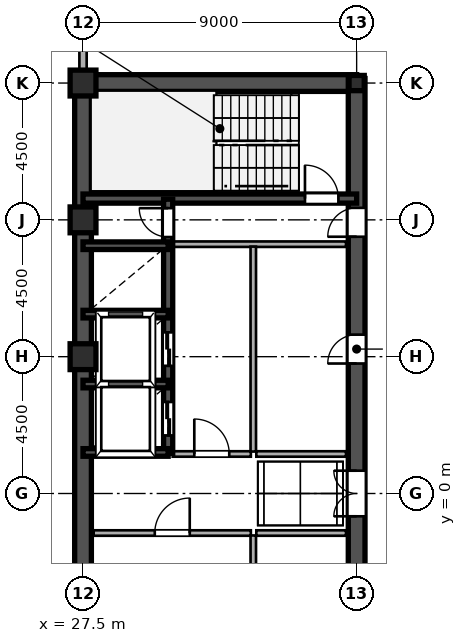
"""IFC4 building model, lengths in metres.
Left out: names, types, materials, properties, quantities, classifications, styles, units other than length and angle.
Written with IfcOpenShell. Run it as: python <this file> out.ifc"""

import sys

from ifc_helpers import new_model, si_unit, direction, frame, frame_2d, origin, origin_2d, place, context, subcontext, project, spatial, rectangle, hollow_rectangle, i_section, extrude, source, transform, mapped, element, fill, save


model = new_model("IFC4")
c1 = context("Model", 3, precision=1e-05, world=origin(), true_north=direction((0.0, 1.0)))
c2 = subcontext(c1, "Body", "Model", "MODEL_VIEW")
j1 = project(units=[si_unit("LENGTHUNIT", "METRE"), si_unit("PLANEANGLEUNIT", "RADIAN")], contexts=[c1])
p1 = place(None, origin())
s1 = spatial("IfcSite", under=j1, at=p1, CompositionType="ELEMENT")
p2 = place(p1, origin())
s2 = spatial("IfcBuilding", under=s1, at=p2, CompositionType="ELEMENT")
p3 = place(p2, frame((0.0, 0.0, 203.1)))
s3 = spatial("IfcBuildingStorey", under=s2, at=p3, CompositionType="ELEMENT", Elevation=203.1)
m1 = source(origin(), c2, "Body", "SweptSolid", [
    extrude(hollow_rectangle(XDim=0.85, YDim=0.85, WallThickness=0.036, at=origin_2d()), origin(), (0.0, 0.0, 1.0), 3.6),
])
for number, where, z_axis, x_axis in (
    (1, (27.5, 4.5, 0.0), (0.0, 0.0, 1.0), (1.0, 0.0, 0.0)),
    (2, (27.5, 9.0, 0.0), (0.0, 0.0, 1.0), (1.0, 0.0, 0.0)),
    (3, (27.5, 13.5, 0.0), (0.0, 0.0, 1.0), (1.0, 0.0, 0.0)),
):
    element("IfcColumn", number, at=place(p3, frame(where, z_axis=z_axis, x_axis=x_axis)), inside=s3, PredefinedType="COLUMN", context=c2, shape_type="MappedRepresentation", body=[
        mapped(m1, transform((0.0, 0.0, 0.0), scale=1.0)),
    ])
m2 = source(origin(), c2, "Body", "SweptSolid", [
    extrude(i_section(OverallWidth=0.5, OverallDepth=0.5, WebThickness=0.02, FlangeThickness=0.032, at=origin_2d()), origin(), (0.0, 0.0, 1.0), 3.6),
])
p4 = place(p3, frame((36.5, 13.5, 0.0), z_axis=(0.0, 0.0, 1.0), x_axis=(1.0, 0.0, 0.0)))
e4 = element("IfcColumn", 4, at=p4, inside=s3, PredefinedType="COLUMN", context=c2, shape_type="MappedRepresentation", body=[
    mapped(m2, transform((0.0, 0.0, 0.0), scale=1.0)),
])
p5 = place(p3, frame((27.5, 13.78, 0.0), z_axis=(0.0, 0.0, 1.0), x_axis=(0.0, 1.0, 0.0)))
e5 = element("IfcWall", 5, at=p5, inside=s3, PredefinedType="SOLIDWALL", context=c2, shape_type="SweptSolid", body=[
    extrude(rectangle(XDim=0.6, YDim=0.24, at=frame_2d((0.3, 0.0))), origin(), (0.0, 0.0, 1.0), 2.88),
])
p6 = place(p3, frame((27.5, 14.38, 0.0), z_axis=(0.0, 0.0, 1.0), x_axis=(0.0, 1.0, 0.0)))
e6 = element("IfcWall", 6, at=p6, inside=s3, PredefinedType="SOLIDWALL", context=c2, shape_type="SweptSolid", body=[
    extrude(rectangle(XDim=1.6, YDim=0.24, at=frame_2d((0.8, 0.0))), origin(), (0.0, 0.0, 1.0), 3.38),
])
for number, where, z_axis, x_axis in (
    (7, (27.5, -13.5, 0.0), (0.0, 0.0, 1.0), (0.0, 1.0, 0.0)),
    (8, (27.5, 1.3, 0.0), (0.0, 0.0, 1.0), (0.0, 1.0, 0.0)),
):
    element("IfcWall", number, at=place(p3, frame(where, z_axis=z_axis, x_axis=x_axis)), inside=s3, PredefinedType="SHEAR", context=c2, shape_type="SweptSolid", body=[
        extrude(rectangle(XDim=12.2, YDim=0.55, at=frame_2d((6.1, 0.0))), origin(), (0.0, 0.0, 1.0), 3.38),
    ])
p7 = place(p3, frame((27.5, -1.3, 0.0), z_axis=(0.0, 0.0, 1.0), x_axis=(0.0, 1.0, 0.0)))
e9 = element("IfcWall", 9, at=p7, inside=s3, PredefinedType="SHEAR", context=c2, shape_type="SweptSolid", body=[
    extrude(rectangle(XDim=2.6, YDim=0.55, at=frame_2d((1.3, 0.0))), origin(), (0.0, 0.0, 1.0), 3.38),
])
p8 = place(p3, frame((27.5, 13.5, 0.0), z_axis=(0.0, 0.0, 1.0), x_axis=(1.0, 0.0, 0.0)))
e10 = element("IfcWall", 10, at=p8, inside=s3, PredefinedType="SHEAR", context=c2, shape_type="SweptSolid", body=[
    extrude(rectangle(XDim=9.0, YDim=0.55, at=frame_2d((4.5, 0.0))), origin(), (0.0, 0.0, 1.0), 3.38),
])
p9 = place(p3, frame((36.5, -1.3, 0.0), z_axis=(0.0, 0.0, 1.0), x_axis=(0.0, 1.0, 0.0)))
e11 = element("IfcWall", 11, at=p9, inside=s3, PredefinedType="SHEAR", context=c2, shape_type="SweptSolid", body=[
    extrude(rectangle(XDim=2.6, YDim=0.55, at=frame_2d((1.3, 0.0))), origin(), (0.0, 0.0, 1.0), 3.38),
])
p10 = place(p9, frame((0.55, 0.0, 0.0)))
e12 = element("IfcOpeningElement", 12, at=p10, cuts=e11, PredefinedType="OPENING", context=c2, shape_type="SweptSolid", body=[
    extrude(rectangle(XDim=1.5, YDim=2.3, at=frame_2d((0.75, 1.15))), frame((0.0, 0.285, 0.0), z_axis=(0.0, -1.0, 0.0), x_axis=(1.0, 0.0, 0.0)), (0.0, 0.0, 1.0), 0.57),
])
p11 = place(p3, frame((36.5, 8.2, 0.0), z_axis=(0.0, 0.0, 1.0), x_axis=(0.0, 1.0, 0.0)))
e13 = element("IfcWall", 13, at=p11, inside=s3, PredefinedType="SHEAR", context=c2, shape_type="SweptSolid", body=[
    extrude(rectangle(XDim=5.45, YDim=0.55, at=frame_2d((2.725, 0.0))), origin(), (0.0, 0.0, 1.0), 3.38),
])
p12 = place(p11, frame((0.245, 0.0, 0.0)))
e14 = element("IfcOpeningElement", 14, at=p12, cuts=e13, PredefinedType="OPENING", context=c2, shape_type="SweptSolid", body=[
    extrude(rectangle(XDim=0.95, YDim=2.15, at=frame_2d((0.475, 1.075))), frame((0.0, 0.285, 0.0), z_axis=(0.0, -1.0, 0.0), x_axis=(1.0, 0.0, 0.0)), (0.0, 0.0, 1.0), 0.57),
])
p13 = place(p3, frame((36.5, -6.5, 0.0), z_axis=(0.0, 0.0, 1.0), x_axis=(0.0, 1.0, 0.0)))
e15 = element("IfcWall", 15, at=p13, inside=s3, PredefinedType="SHEAR", context=c2, shape_type="SweptSolid", body=[
    extrude(rectangle(XDim=5.2, YDim=0.55, at=frame_2d((2.6, 0.0))), origin(), (0.0, 0.0, 1.0), 3.38),
])
p14 = place(p13, frame((2.125, 0.0, 0.0)))
e16 = element("IfcOpeningElement", 16, at=p14, cuts=e15, PredefinedType="OPENING", context=c2, shape_type="SweptSolid", body=[
    extrude(rectangle(XDim=0.95, YDim=2.15, at=frame_2d((0.475, 1.075))), frame((0.0, 0.285, 0.0), z_axis=(0.0, -1.0, 0.0), x_axis=(1.0, 0.0, 0.0)), (0.0, 0.0, 1.0), 0.57),
])
p15 = place(p3, frame((36.5, 1.3, 0.0), z_axis=(0.0, 0.0, 1.0), x_axis=(0.0, 1.0, 0.0)))
e17 = element("IfcWall", 17, at=p15, inside=s3, PredefinedType="SHEAR", context=c2, shape_type="SweptSolid", body=[
    extrude(rectangle(XDim=6.9, YDim=0.55, at=frame_2d((3.45, 0.0))), origin(), (0.0, 0.0, 1.0), 3.38),
])
p16 = place(p15, frame((2.975, 0.0, 0.0)))
e18 = element("IfcOpeningElement", 18, at=p16, cuts=e17, PredefinedType="OPENING", context=c2, shape_type="SweptSolid", body=[
    extrude(rectangle(XDim=0.95, YDim=2.15, at=frame_2d((0.475, 1.075))), frame((0.0, 0.285, 0.0), z_axis=(0.0, -1.0, 0.0), x_axis=(1.0, 0.0, 0.0)), (0.0, 0.0, 1.0), 0.57),
])
p17 = place(p3, frame((27.5, 9.7, 0.0), z_axis=(0.0, 0.0, 1.0), x_axis=(1.0, 0.0, 0.0)))
e19 = element("IfcWall", 19, at=p17, inside=s3, PredefinedType="SHEAR", context=c2, shape_type="SweptSolid", body=[
    extrude(rectangle(XDim=9.0, YDim=0.3, at=frame_2d((4.5, 0.0))), origin(), (0.0, 0.0, 1.0), 3.38),
])
p18 = place(p17, frame((7.3, 0.0, 0.0)))
e20 = element("IfcOpeningElement", 20, at=p18, cuts=e19, PredefinedType="OPENING", context=c2, shape_type="SweptSolid", body=[
    extrude(rectangle(XDim=1.1, YDim=2.2, at=frame_2d((0.55, 1.1))), frame((0.0, 0.16, 0.0), z_axis=(0.0, -1.0, 0.0), x_axis=(1.0, 0.0, 0.0)), (0.0, 0.0, 1.0), 0.32),
])
for number, where, z_axis, x_axis in (
    (21, (27.5, 1.35, 0.0), (0.0, 0.0, 1.0), (1.0, 0.0, 0.0)),
    (22, (27.5, 3.6, 0.0), (0.0, 0.0, 1.0), (1.0, 0.0, 0.0)),
    (23, (27.5, 5.9, 0.0), (0.0, 0.0, 1.0), (1.0, 0.0, 0.0)),
    (24, (27.5, 8.15, 0.0), (0.0, 0.0, 1.0), (1.0, 0.0, 0.0)),
):
    element("IfcWall", number, at=place(p3, frame(where, z_axis=z_axis, x_axis=x_axis)), inside=s3, PredefinedType="SHEAR", context=c2, shape_type="SweptSolid", body=[
        extrude(rectangle(XDim=2.8, YDim=0.25, at=frame_2d((1.4, 0.0))), origin(), (0.0, 0.0, 1.0), 3.38),
    ])
p19 = place(p3, frame((30.3, 1.32, 0.0), z_axis=(0.0, 0.0, 1.0), x_axis=(0.0, 1.0, 0.0)))
e25 = element("IfcWall", 25, at=p19, inside=s3, PredefinedType="SHEAR", context=c2, shape_type="SweptSolid", body=[
    extrude(rectangle(XDim=2.28, YDim=0.3, at=frame_2d((1.14, 0.0))), origin(), (0.0, 0.0, 1.0), 3.38),
])
p20 = place(p19, frame((0.59, 0.0, 0.0)))
e26 = element("IfcOpeningElement", 26, at=p20, cuts=e25, PredefinedType="OPENING", context=c2, shape_type="SweptSolid", body=[
    extrude(rectangle(XDim=1.1, YDim=2.2, at=frame_2d((0.55, 1.1))), frame((0.0, 0.16, 0.0), z_axis=(0.0, -1.0, 0.0), x_axis=(1.0, 0.0, 0.0)), (0.0, 0.0, 1.0), 0.32),
])
p21 = place(p3, frame((30.3, 3.6, 0.0), z_axis=(0.0, 0.0, 1.0), x_axis=(0.0, 1.0, 0.0)))
e27 = element("IfcWall", 27, at=p21, inside=s3, PredefinedType="SHEAR", context=c2, shape_type="SweptSolid", body=[
    extrude(rectangle(XDim=2.3, YDim=0.3, at=frame_2d((1.15, 0.0))), origin(), (0.0, 0.0, 1.0), 3.38),
])
p22 = place(p21, frame((0.6, 0.0, 0.0)))
e28 = element("IfcOpeningElement", 28, at=p22, cuts=e27, PredefinedType="OPENING", context=c2, shape_type="SweptSolid", body=[
    extrude(rectangle(XDim=1.1, YDim=2.2, at=frame_2d((0.55, 1.1))), frame((0.0, 0.16, 0.0), z_axis=(0.0, -1.0, 0.0), x_axis=(1.0, 0.0, 0.0)), (0.0, 0.0, 1.0), 0.32),
])
p23 = place(p3, frame((30.3, 5.9, 0.0), z_axis=(0.0, 0.0, 1.0), x_axis=(0.0, 1.0, 0.0)))
e29 = element("IfcWall", 29, at=p23, inside=s3, PredefinedType="SHEAR", context=c2, shape_type="SweptSolid", body=[
    extrude(rectangle(XDim=2.25, YDim=0.3, at=frame_2d((1.125, 0.0))), origin(), (0.0, 0.0, 1.0), 3.38),
])
p24 = place(p3, frame((30.3, 8.15, 0.0), z_axis=(0.0, 0.0, 1.0), x_axis=(0.0, 1.0, 0.0)))
e30 = element("IfcWall", 30, at=p24, inside=s3, PredefinedType="SHEAR", context=c2, shape_type="SweptSolid", body=[
    extrude(rectangle(XDim=1.53, YDim=0.3, at=frame_2d((0.765, 0.0))), origin(), (0.0, 0.0, 1.0), 3.38),
])
p25 = place(p24, frame((0.285, 0.0, 0.0)))
e31 = element("IfcOpeningElement", 31, at=p25, cuts=e30, PredefinedType="OPENING", context=c2, shape_type="SweptSolid", body=[
    extrude(rectangle(XDim=0.95, YDim=2.15, at=frame_2d((0.475, 1.075))), frame((0.0, 0.16, 0.0), z_axis=(0.0, -1.0, 0.0), x_axis=(1.0, 0.0, 0.0)), (0.0, 0.0, 1.0), 0.32),
])
p26 = place(p3, frame((30.45, 8.2, 0.0), z_axis=(0.0, 0.0, 1.0), x_axis=(1.0, 0.0, 0.0)))
e32 = element("IfcWall", 32, at=p26, inside=s3, PredefinedType="PARTITIONING", context=c2, shape_type="SweptSolid", body=[
    extrude(rectangle(XDim=5.7, YDim=0.18, at=frame_2d((2.85, 0.0))), origin(), (0.0, 0.0, 1.0), 3.38),
])
p27 = place(p3, frame((33.1, -6.42, 0.0), z_axis=(0.0, 0.0, 1.0), x_axis=(0.0, 1.0, 0.0)))
e33 = element("IfcWall", 33, at=p27, inside=s3, PredefinedType="PARTITIONING", context=c2, shape_type="SweptSolid", body=[
    extrude(rectangle(XDim=5.04, YDim=0.18, at=frame_2d((2.52, 0.0))), origin(), (0.0, 0.0, 1.0), 3.38),
])
p28 = place(p3, frame((33.1, 1.38, 0.0), z_axis=(0.0, 0.0, 1.0), x_axis=(0.0, 1.0, 0.0)))
e34 = element("IfcWall", 34, at=p28, inside=s3, PredefinedType="PARTITIONING", context=c2, shape_type="SweptSolid", body=[
    extrude(rectangle(XDim=6.74, YDim=0.18, at=frame_2d((3.37, 0.0))), origin(), (0.0, 0.0, 1.0), 3.38),
])
p29 = place(p3, frame((27.85, -1.3, 0.0), z_axis=(0.0, 0.0, 1.0), x_axis=(1.0, 0.0, 0.0)))
e35 = element("IfcWall", 35, at=p29, inside=s3, PredefinedType="PARTITIONING", context=c2, shape_type="SweptSolid", body=[
    extrude(rectangle(XDim=5.17, YDim=0.18, at=frame_2d((2.585, 0.0))), origin(), (0.0, 0.0, 1.0), 3.38),
])
p30 = place(p29, frame((2.01, 0.0, 0.0)))
e36 = element("IfcOpeningElement", 36, at=p30, cuts=e35, PredefinedType="OPENING", context=c2, shape_type="SweptSolid", body=[
    extrude(rectangle(XDim=1.15, YDim=2.2, at=frame_2d((0.575, 1.1))), frame((0.0, 0.1, 0.0), z_axis=(0.0, -1.0, 0.0), x_axis=(1.0, 0.0, 0.0)), (0.0, 0.0, 1.0), 0.2),
])
p31 = place(p3, frame((30.45, 1.3, 0.0), z_axis=(0.0, 0.0, 1.0), x_axis=(1.0, 0.0, 0.0)))
e37 = element("IfcWall", 37, at=p31, inside=s3, PredefinedType="PARTITIONING", context=c2, shape_type="SweptSolid", body=[
    extrude(rectangle(XDim=2.57, YDim=0.18, at=frame_2d((1.285, 0.0))), origin(), (0.0, 0.0, 1.0), 3.38),
])
p32 = place(p31, frame((0.71, 0.0, 0.0)))
e38 = element("IfcOpeningElement", 38, at=p32, cuts=e37, PredefinedType="OPENING", context=c2, shape_type="SweptSolid", body=[
    extrude(rectangle(XDim=1.15, YDim=2.2, at=frame_2d((0.575, 1.1))), frame((0.0, 0.1, 0.0), z_axis=(0.0, -1.0, 0.0), x_axis=(1.0, 0.0, 0.0)), (0.0, 0.0, 1.0), 0.2),
])
for number, where, z_axis, x_axis in (
    (39, (33.2, -1.3, 0.0), (0.0, 0.0, 1.0), (1.0, 0.0, 0.0)),
    (40, (33.2, 1.3, 0.0), (0.0, 0.0, 1.0), (1.0, 0.0, 0.0)),
):
    element("IfcWall", number, at=place(p3, frame(where, z_axis=z_axis, x_axis=x_axis)), inside=s3, PredefinedType="PARTITIONING", context=c2, shape_type="SweptSolid", body=[
        extrude(rectangle(XDim=2.95, YDim=0.18, at=frame_2d((1.475, 0.0))), origin(), (0.0, 0.0, 1.0), 3.38),
    ])
m3 = source(origin(), c2, "Body", "SweptSolid", [
    extrude(rectangle(XDim=1.5, YDim=2.3, at=frame_2d((0.75, 1.15))), frame((0.0, 0.025, 0.0), z_axis=(0.0, -1.0, 0.0), x_axis=(1.0, 0.0, 0.0)), (0.0, 0.0, 1.0), 0.05),
])
p33 = place(p10, origin())
e41 = element("IfcDoor", 41, at=p33, inside=s3, OperationType="DOUBLE_SWING_LEFT", PredefinedType="DOOR", context=c2, shape_type="MappedRepresentation", body=[
    mapped(m3, transform((0.0, 0.0, 0.0), scale=1.0)),
])
fill(e12, e41)
m4 = source(origin(), c2, "Body", "SweptSolid", [
    extrude(rectangle(XDim=0.95, YDim=2.15, at=frame_2d((0.475, 1.075))), frame((0.0, 0.025, 0.0), z_axis=(0.0, -1.0, 0.0), x_axis=(1.0, 0.0, 0.0)), (0.0, 0.0, 1.0), 0.05),
])
p34 = place(p12, origin())
e42 = element("IfcDoor", 42, at=p34, inside=s3, OperationType="SINGLE_SWING_LEFT", PredefinedType="DOOR", context=c2, shape_type="MappedRepresentation", body=[
    mapped(m4, transform((0.0, 0.0, 0.0), scale=1.0)),
])
fill(e14, e42)
p35 = place(p16, origin())
e43 = element("IfcDoor", 43, at=p35, inside=s3, OperationType="SINGLE_SWING_LEFT", PredefinedType="DOOR", context=c2, shape_type="MappedRepresentation", body=[
    mapped(m4, transform((0.0, 0.0, 0.0), scale=1.0)),
])
fill(e18, e43)
m5 = source(origin(), c2, "Body", "SweptSolid", [
    extrude(rectangle(XDim=1.1, YDim=2.2, at=frame_2d((0.55, 1.1))), frame((0.0, 0.025, 0.0), z_axis=(0.0, -1.0, 0.0), x_axis=(1.0, 0.0, 0.0)), (0.0, 0.0, 1.0), 0.05),
])
p36 = place(p18, origin())
e44 = element("IfcDoor", 44, at=p36, inside=s3, OperationType="SINGLE_SWING_LEFT", PredefinedType="DOOR", context=c2, shape_type="MappedRepresentation", body=[
    mapped(m5, transform((0.0, 0.0, 0.0), scale=1.0)),
])
fill(e20, e44)
m6 = source(origin(), c2, "Body", "SweptSolid", [
    extrude(rectangle(XDim=1.1, YDim=2.2, at=frame_2d((0.55, 1.1))), frame((0.0, 0.025, 0.0), z_axis=(0.0, -1.0, 0.0), x_axis=(1.0, 0.0, 0.0)), (0.0, 0.0, 1.0), 0.05),
])
p37 = place(p20, origin())
e45 = element("IfcDoor", 45, at=p37, inside=s3, OperationType="DOUBLE_DOOR_SLIDING", PredefinedType="DOOR", context=c2, shape_type="MappedRepresentation", body=[
    mapped(m6, transform((0.0, 0.0, 0.0), scale=1.0)),
])
fill(e26, e45)
p38 = place(p22, origin())
e46 = element("IfcDoor", 46, at=p38, inside=s3, OperationType="DOUBLE_DOOR_SLIDING", PredefinedType="DOOR", context=c2, shape_type="MappedRepresentation", body=[
    mapped(m6, transform((0.0, 0.0, 0.0), scale=1.0)),
])
fill(e28, e46)
p39 = place(p25, origin())
e47 = element("IfcDoor", 47, at=p39, inside=s3, OperationType="SINGLE_SWING_RIGHT", PredefinedType="DOOR", context=c2, shape_type="MappedRepresentation", body=[
    mapped(m4, transform((0.0, 0.0, 0.0), scale=1.0)),
])
fill(e31, e47)
m7 = source(origin(), c2, "Body", "SweptSolid", [
    extrude(rectangle(XDim=1.15, YDim=2.2, at=frame_2d((0.575, 1.1))), frame((0.0, 0.025, 0.0), z_axis=(0.0, -1.0, 0.0), x_axis=(1.0, 0.0, 0.0)), (0.0, 0.0, 1.0), 0.05),
])
p40 = place(p30, origin())
e48 = element("IfcDoor", 48, at=p40, inside=s3, OperationType="SINGLE_SWING_RIGHT", PredefinedType="DOOR", context=c2, shape_type="MappedRepresentation", body=[
    mapped(m7, transform((0.0, 0.0, 0.0), scale=1.0)),
])
fill(e36, e48)
p41 = place(p32, origin())
e49 = element("IfcDoor", 49, at=p41, inside=s3, OperationType="SINGLE_SWING_LEFT", PredefinedType="DOOR", context=c2, shape_type="MappedRepresentation", body=[
    mapped(m7, transform((0.0, 0.0, 0.0), scale=1.0)),
])
fill(e38, e49)
save(model, sys.argv[1])
